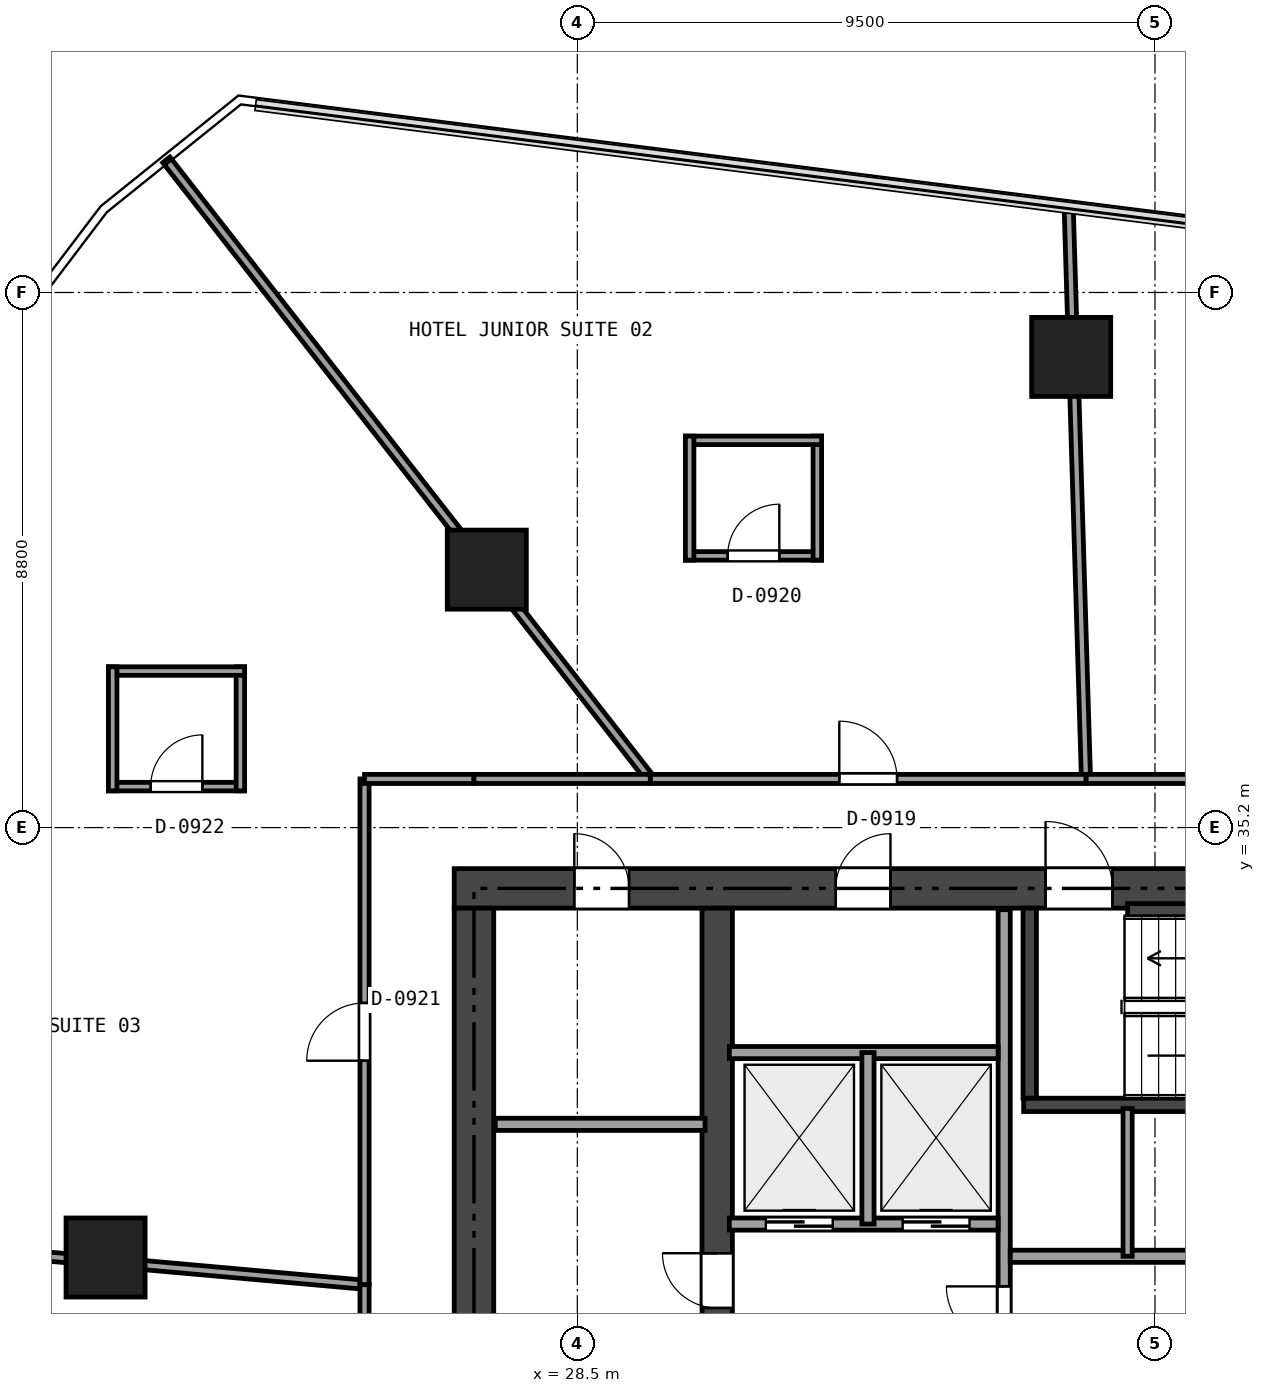
"""IFC4 building model, lengths in metres.
Left out: names, types, materials, properties, quantities, classifications, styles, units other than length and angle.
Written with IfcOpenShell. Run it as: python <this file> out.ifc"""

import sys

from ifc_helpers import new_model, si_unit, direction, frame, frame_2d, origin, origin_2d, place, context, subcontext, project, spatial, rectangle, extrude, element, fill, save


model = new_model("IFC4")
c1 = context("Model", 3, precision=1e-05, world=origin(), true_north=direction((0.0, 1.0)))
c2 = subcontext(c1, "Body", "Model", "MODEL_VIEW")
j1 = project(units=[si_unit("LENGTHUNIT", "METRE"), si_unit("PLANEANGLEUNIT", "RADIAN")], contexts=[c1])
p1 = place(None, origin())
s1 = spatial("IfcSite", under=j1, at=p1, CompositionType="ELEMENT")
p2 = place(p1, origin())
s2 = spatial("IfcBuilding", under=s1, at=p2, CompositionType="ELEMENT")
p3 = place(p2, frame((0.0, 0.0, 40.8)))
s3 = spatial("IfcBuildingStorey", under=s2, at=p3, CompositionType="ELEMENT", Elevation=40.8)
p4 = place(p3, frame((26.475, 34.2, 0.0), z_axis=(0.0, 0.0, 1.0), x_axis=(1.0, 0.0, 0.0)))
e1 = element("IfcWall", 1, at=p4, inside=s3, PredefinedType="SHEAR", context=c2, shape_type="SweptSolid", body=[
    extrude(rectangle(XDim=21.45, YDim=0.65, at=frame_2d((10.725, 0.0))), origin(), (0.0, 0.0, 1.0), 3.17),
])
p5 = place(p4, frame((9.725, 0.0, 0.0)))
e2 = element("IfcOpeningElement", 2, at=p5, cuts=e1, PredefinedType="OPENING", context=c2, shape_type="SweptSolid", body=[
    extrude(rectangle(XDim=1.1, YDim=2.15, at=frame_2d((0.55, 1.075))), frame((0.0, 0.335, 0.0), z_axis=(0.0, -1.0, 0.0), x_axis=(1.0, 0.0, 0.0)), (0.0, 0.0, 1.0), 0.67),
])
p6 = place(p4, frame((1.975, 0.0, 0.0)))
e3 = element("IfcOpeningElement", 3, at=p6, cuts=e1, PredefinedType="OPENING", context=c2, shape_type="SweptSolid", body=[
    extrude(rectangle(XDim=0.9, YDim=2.1, at=frame_2d((0.45, 1.05))), frame((0.0, 0.335, 0.0), z_axis=(0.0, -1.0, 0.0), x_axis=(1.0, 0.0, 0.0)), (0.0, 0.0, 1.0), 0.67),
])
p7 = place(p4, frame((6.275, 0.0, 0.0)))
e4 = element("IfcOpeningElement", 4, at=p7, cuts=e1, PredefinedType="OPENING", context=c2, shape_type="SweptSolid", body=[
    extrude(rectangle(XDim=0.9, YDim=2.1, at=frame_2d((0.45, 1.05))), frame((0.0, 0.335, 0.0), z_axis=(0.0, -1.0, 0.0), x_axis=(1.0, 0.0, 0.0)), (0.0, 0.0, 1.0), 0.67),
])
p8 = place(p3, frame((26.8, 18.925, 0.0), z_axis=(0.0, 0.0, 1.0), x_axis=(0.0, 1.0, 0.0)))
e5 = element("IfcWall", 5, at=p8, inside=s3, PredefinedType="SHEAR", context=c2, shape_type="SweptSolid", body=[
    extrude(rectangle(XDim=14.95, YDim=0.65, at=frame_2d((7.475, 0.0))), origin(), (0.0, 0.0, 1.0), 3.17),
])
p9 = place(p3, frame((30.8, 18.925, 0.0), z_axis=(0.0, 0.0, 1.0), x_axis=(0.0, 1.0, 0.0)))
e6 = element("IfcWall", 6, at=p9, inside=s3, PredefinedType="SHEAR", context=c2, shape_type="SweptSolid", body=[
    extrude(rectangle(XDim=14.95, YDim=0.5, at=frame_2d((7.475, 0.0))), origin(), (0.0, 0.0, 1.0), 3.17),
])
p10 = place(p9, frame((6.575, 0.0, 0.0)))
e7 = element("IfcOpeningElement", 7, at=p10, cuts=e6, PredefinedType="OPENING", context=c2, shape_type="SweptSolid", body=[
    extrude(rectangle(XDim=1.1, YDim=2.15, at=frame_2d((0.55, 1.075))), frame((0.0, 0.26, 0.0), z_axis=(0.0, -1.0, 0.0), x_axis=(1.0, 0.0, 0.0)), (0.0, 0.0, 1.0), 0.52),
])
p11 = place(p9, frame((8.375, 0.0, 0.0)))
e8 = element("IfcOpeningElement", 8, at=p11, cuts=e6, PredefinedType="OPENING", context=c2, shape_type="SweptSolid", body=[
    extrude(rectangle(XDim=0.9, YDim=2.1, at=frame_2d((0.45, 1.05))), frame((0.0, 0.26, 0.0), z_axis=(0.0, -1.0, 0.0), x_axis=(1.0, 0.0, 0.0)), (0.0, 0.0, 1.0), 0.52),
])
p12 = place(p3, frame((35.84, 30.64, 0.0), z_axis=(0.0, 0.0, 1.0), x_axis=(1.0, 0.0, 0.0)))
e9 = element("IfcWall", 9, at=p12, inside=s3, PredefinedType="SHEAR", context=c2, shape_type="SweptSolid", body=[
    extrude(rectangle(XDim=7.61, YDim=0.22, at=frame_2d((3.805, 0.0))), origin(), (0.0, 0.0, 1.0), 3.17),
])
p13 = place(p3, frame((35.94, 30.75, 0.0), z_axis=(0.0, 0.0, 1.0), x_axis=(0.0, 1.0, 0.0)))
e10 = element("IfcWall", 10, at=p13, inside=s3, PredefinedType="SHEAR", context=c2, shape_type="SweptSolid", body=[
    extrude(rectangle(XDim=3.125, YDim=0.22, at=frame_2d((1.562, 0.0))), origin(), (0.0, 0.0, 1.0), 3.17),
])
p14 = place(p3, frame((37.55, 33.84, 0.0), z_axis=(0.0, 0.0, 1.0), x_axis=(1.0, 0.0, 0.0)))
e11 = element("IfcWall", 11, at=p14, inside=s3, PredefinedType="SHEAR", context=c2, shape_type="SweptSolid", body=[
    extrude(rectangle(XDim=5.9, YDim=0.22, at=frame_2d((2.95, 0.0))), origin(), (0.0, 0.0, 1.0), 3.17),
])
for number, where, z_axis, x_axis in (
    (12, (36.622, 42.94, 0.0), (0.0, 0.0, 1.0), (1.0, 0.0, 0.0)),
    (13, (27.011, 39.442, 0.0), (0.0, 0.0, 1.0), (1.0, 0.0, 0.0)),
    (14, (20.741, 28.13, 0.0), (0.0, 0.0, 1.0), (1.0, 0.0, 0.0)),
):
    element("IfcColumn", number, at=place(p3, frame(where, z_axis=z_axis, x_axis=x_axis)), inside=s3, PredefinedType="COLUMN", context=c2, shape_type="SweptSolid", body=[
        extrude(rectangle(XDim=1.3, YDim=1.3, at=origin_2d()), origin(), (0.0, 0.0, 1.0), 3.17),
    ])
p15 = place(p3, frame((27.15, 30.32, 0.0), z_axis=(0.0, 0.0, 1.0), x_axis=(1.0, 0.0, 0.0)))
e15 = element("IfcWall", 15, at=p15, inside=s3, PredefinedType="SOLIDWALL", context=c2, shape_type="SweptSolid", body=[
    extrude(rectangle(XDim=3.45, YDim=0.2, at=frame_2d((1.725, 0.0))), origin(), (0.0, 0.0, 1.0), 3.17),
])
p16 = place(p3, frame((35.52, 18.95, 0.0), z_axis=(0.0, 0.0, 1.0), x_axis=(0.0, 1.0, 0.0)))
e16 = element("IfcWall", 16, at=p16, inside=s3, PredefinedType="SOLIDWALL", context=c2, shape_type="SweptSolid", body=[
    extrude(rectangle(XDim=14.9, YDim=0.2, at=frame_2d((7.45, 0.0))), origin(), (0.0, 0.0, 1.0), 2.691),
])
p17 = place(p16, frame((7.755, 0.0, 0.0)))
e17 = element("IfcOpeningElement", 17, at=p17, cuts=e16, PredefinedType="OPENING", context=c2, shape_type="SweptSolid", body=[
    extrude(rectangle(XDim=0.95, YDim=2.15, at=frame_2d((0.475, 1.075))), frame((0.0, 0.11, 0.0), z_axis=(0.0, -1.0, 0.0), x_axis=(1.0, 0.0, 0.0)), (0.0, 0.0, 1.0), 0.22),
])
p18 = place(p16, frame((0.6, 0.0, 0.0)))
e18 = element("IfcOpeningElement", 18, at=p18, cuts=e16, PredefinedType="OPENING", context=c2, shape_type="SweptSolid", body=[
    extrude(rectangle(XDim=0.9, YDim=2.1, at=frame_2d((0.45, 1.05))), frame((0.0, 0.11, 0.0), z_axis=(0.0, -1.0, 0.0), x_axis=(1.0, 0.0, 0.0)), (0.0, 0.0, 1.0), 0.22),
])
p19 = place(p3, frame((31.0, 28.68, 0.0), z_axis=(0.0, 0.0, 1.0), x_axis=(1.0, 0.0, 0.0)))
e19 = element("IfcWall", 19, at=p19, inside=s3, PredefinedType="SOLIDWALL", context=c2, shape_type="SweptSolid", body=[
    extrude(rectangle(XDim=4.42, YDim=0.2, at=frame_2d((2.21, 0.0))), origin(), (0.0, 0.0, 1.0), 3.17),
])
p20 = place(p19, frame((0.6, 0.0, 0.0)))
e20 = element("IfcOpeningElement", 20, at=p20, cuts=e19, PredefinedType="OPENING", context=c2, shape_type="SweptSolid", body=[
    extrude(rectangle(XDim=1.1, YDim=2.15, at=frame_2d((0.55, 1.075))), frame((0.0, 0.11, 0.0), z_axis=(0.0, -1.0, 0.0), x_axis=(1.0, 0.0, 0.0)), (0.0, 0.0, 1.0), 0.22),
])
p21 = place(p19, frame((2.85, 0.0, 0.0)))
e21 = element("IfcOpeningElement", 21, at=p21, cuts=e19, PredefinedType="OPENING", context=c2, shape_type="SweptSolid", body=[
    extrude(rectangle(XDim=1.1, YDim=2.15, at=frame_2d((0.55, 1.075))), frame((0.0, 0.11, 0.0), z_axis=(0.0, -1.0, 0.0), x_axis=(1.0, 0.0, 0.0)), (0.0, 0.0, 1.0), 0.22),
])
p22 = place(p3, frame((31.0, 31.5, 0.0), z_axis=(0.0, 0.0, 1.0), x_axis=(1.0, 0.0, 0.0)))
e22 = element("IfcWall", 22, at=p22, inside=s3, PredefinedType="SOLIDWALL", context=c2, shape_type="SweptSolid", body=[
    extrude(rectangle(XDim=4.42, YDim=0.2, at=frame_2d((2.21, 0.0))), origin(), (0.0, 0.0, 1.0), 3.17),
])
p23 = place(p3, frame((33.28, 28.68, 0.0), z_axis=(0.0, 0.0, 1.0), x_axis=(0.0, 1.0, 0.0)))
e23 = element("IfcWall", 23, at=p23, inside=s3, PredefinedType="SOLIDWALL", context=c2, shape_type="SweptSolid", body=[
    extrude(rectangle(XDim=2.82, YDim=0.2, at=frame_2d((1.41, 0.0))), origin(), (0.0, 0.0, 1.0), 3.17),
])
p24 = place(p3, frame((35.62, 28.15, 0.0), z_axis=(0.0, 0.0, 1.0), x_axis=(1.0, 0.0, 0.0)))
e24 = element("IfcWall", 24, at=p24, inside=s3, PredefinedType="SOLIDWALL", context=c2, shape_type="SweptSolid", body=[
    extrude(rectangle(XDim=7.88, YDim=0.2, at=frame_2d((3.94, 0.0))), origin(), (0.0, 0.0, 1.0), 3.17),
])
p25 = place(p3, frame((37.55, 28.15, 0.0), z_axis=(0.0, 0.0, 1.0), x_axis=(0.0, 1.0, 0.0)))
e25 = element("IfcWall", 25, at=p25, inside=s3, PredefinedType="PARTITIONING", context=c2, shape_type="SweptSolid", body=[
    extrude(rectangle(XDim=2.43, YDim=0.15, at=frame_2d((1.215, 0.0))), origin(), (0.0, 0.0, 1.0), 3.17),
])
p26 = place(p3, frame((30.277, 39.668, 0.0), z_axis=(0.0, 0.0, 1.0), x_axis=(1.0, 0.0, 0.0)))
e26 = element("IfcWall", 26, at=p26, inside=s3, PredefinedType="PARTITIONING", context=c2, shape_type="SweptSolid", body=[
    extrude(rectangle(XDim=2.24, YDim=0.14, at=frame_2d((1.12, 0.0))), origin(), (0.0, 0.0, 1.0), 3.17),
])
p27 = place(p26, frame((0.695, 0.0, 0.0)))
e27 = element("IfcOpeningElement", 27, at=p27, cuts=e26, PredefinedType="OPENING", context=c2, shape_type="SweptSolid", body=[
    extrude(rectangle(XDim=0.85, YDim=2.1, at=frame_2d((0.425, 1.05))), frame((0.0, 0.08, 0.0), z_axis=(0.0, -1.0, 0.0), x_axis=(1.0, 0.0, 0.0)), (0.0, 0.0, 1.0), 0.16),
])
p28 = place(p3, frame((32.447, 39.598, 0.0), z_axis=(0.0, 0.0, 1.0), x_axis=(0.0, 1.0, 0.0)))
e28 = element("IfcWall", 28, at=p28, inside=s3, PredefinedType="PARTITIONING", context=c2, shape_type="SweptSolid", body=[
    extrude(rectangle(XDim=2.04, YDim=0.14, at=frame_2d((1.02, 0.0))), origin(), (0.0, 0.0, 1.0), 2.355),
])
p29 = place(p3, frame((32.517, 41.568, 0.0), z_axis=(0.0, 0.0, 1.0), x_axis=(-1.0, 0.0, 0.0)))
e29 = element("IfcWall", 29, at=p29, inside=s3, PredefinedType="PARTITIONING", context=c2, shape_type="SweptSolid", body=[
    extrude(rectangle(XDim=2.24, YDim=0.14, at=frame_2d((1.12, 0.0))), origin(), (0.0, 0.0, 1.0), 2.355),
])
p30 = place(p3, frame((30.347, 41.638, 0.0), z_axis=(0.0, 0.0, 1.0), x_axis=(0.0, -1.0, 0.0)))
e30 = element("IfcWall", 30, at=p30, inside=s3, PredefinedType="PARTITIONING", context=c2, shape_type="SweptSolid", body=[
    extrude(rectangle(XDim=2.04, YDim=0.14, at=frame_2d((1.02, 0.0))), origin(), (0.0, 0.0, 1.0), 2.355),
])
p31 = place(p3, frame((20.788, 35.874, 0.0), z_axis=(0.0, 0.0, 1.0), x_axis=(1.0, 0.0, 0.0)))
e31 = element("IfcWall", 31, at=p31, inside=s3, PredefinedType="PARTITIONING", context=c2, shape_type="SweptSolid", body=[
    extrude(rectangle(XDim=2.24, YDim=0.14, at=frame_2d((1.12, 0.0))), origin(), (0.0, 0.0, 1.0), 3.17),
])
p32 = place(p31, frame((0.695, 0.0, 0.0)))
e32 = element("IfcOpeningElement", 32, at=p32, cuts=e31, PredefinedType="OPENING", context=c2, shape_type="SweptSolid", body=[
    extrude(rectangle(XDim=0.85, YDim=2.1, at=frame_2d((0.425, 1.05))), frame((0.0, 0.08, 0.0), z_axis=(0.0, -1.0, 0.0), x_axis=(1.0, 0.0, 0.0)), (0.0, 0.0, 1.0), 0.16),
])
p33 = place(p3, frame((22.958, 35.804, 0.0), z_axis=(0.0, 0.0, 1.0), x_axis=(0.0, 1.0, 0.0)))
e33 = element("IfcWall", 33, at=p33, inside=s3, PredefinedType="PARTITIONING", context=c2, shape_type="SweptSolid", body=[
    extrude(rectangle(XDim=2.04, YDim=0.14, at=frame_2d((1.02, 0.0))), origin(), (0.0, 0.0, 1.0), 3.17),
])
p34 = place(p3, frame((23.028, 37.774, 0.0), z_axis=(0.0, 0.0, 1.0), x_axis=(-1.0, 0.0, 0.0)))
e34 = element("IfcWall", 34, at=p34, inside=s3, PredefinedType="PARTITIONING", context=c2, shape_type="SweptSolid", body=[
    extrude(rectangle(XDim=2.24, YDim=0.14, at=frame_2d((1.12, 0.0))), origin(), (0.0, 0.0, 1.0), 3.17),
])
p35 = place(p3, frame((20.858, 37.844, 0.0), z_axis=(0.0, 0.0, 1.0), x_axis=(0.0, -1.0, 0.0)))
e35 = element("IfcWall", 35, at=p35, inside=s3, PredefinedType="PARTITIONING", context=c2, shape_type="SweptSolid", body=[
    extrude(rectangle(XDim=2.04, YDim=0.14, at=frame_2d((1.02, 0.0))), origin(), (0.0, 0.0, 1.0), 3.17),
])
p36 = place(p3, frame((36.58, 45.434, 0.0), z_axis=(0.0, 0.0, 1.0), x_axis=(0.03018653739, -0.999544282641, 0.0)))
e36 = element("IfcWall", 36, at=p36, inside=s3, PredefinedType="PARTITIONING", context=c2, shape_type="SweptSolid", body=[
    extrude(rectangle(XDim=9.438, YDim=0.15, at=frame_2d((4.719, 0.0))), origin(), (0.0, 0.0, 1.0), 2.395),
])
p37 = place(p3, frame((36.865, 36.0, 0.0), z_axis=(0.0, 0.0, 1.0), x_axis=(1.0, 0.0, 0.0)))
e37 = element("IfcWall", 37, at=p37, inside=s3, PredefinedType="PARTITIONING", context=c2, shape_type="SweptSolid", body=[
    extrude(rectangle(XDim=7.31, YDim=0.15, at=frame_2d((3.655, 0.0))), origin(), (0.0, 0.0, 1.0), 2.395),
])
p38 = place(p37, frame((3.18, 0.0, 0.0)))
e38 = element("IfcOpeningElement", 38, at=p38, cuts=e37, PredefinedType="OPENING", context=c2, shape_type="SweptSolid", body=[
    extrude(rectangle(XDim=0.95, YDim=2.15, at=frame_2d((0.475, 1.075))), frame((0.0, 0.085, 0.0), z_axis=(0.0, -1.0, 0.0), x_axis=(1.0, 0.0, 0.0)), (0.0, 0.0, 1.0), 0.17),
])
p39 = place(p3, frame((21.74, 46.182, 0.0), z_axis=(0.0, 0.0, 1.0), x_axis=(0.615901715435, -0.787822998474, 0.0)))
e39 = element("IfcWall", 39, at=p39, inside=s3, PredefinedType="PARTITIONING", context=c2, shape_type="SweptSolid", body=[
    extrude(rectangle(XDim=12.924, YDim=0.15, at=frame_2d((6.462, 0.0))), origin(), (0.0, 0.0, 1.0), 2.395),
])
p40 = place(p3, frame((29.7, 36.0, 0.0), z_axis=(0.0, 0.0, 1.0), x_axis=(1.0, 0.0, 0.0)))
e40 = element("IfcWall", 40, at=p40, inside=s3, PredefinedType="PARTITIONING", context=c2, shape_type="SweptSolid", body=[
    extrude(rectangle(XDim=7.165, YDim=0.15, at=frame_2d((3.583, 0.0))), origin(), (0.0, 0.0, 1.0), 2.395),
])
p41 = place(p40, frame((3.108, 0.0, 0.0)))
e41 = element("IfcOpeningElement", 41, at=p41, cuts=e40, PredefinedType="OPENING", context=c2, shape_type="SweptSolid", body=[
    extrude(rectangle(XDim=0.95, YDim=2.15, at=frame_2d((0.475, 1.075))), frame((0.0, 0.085, 0.0), z_axis=(0.0, -1.0, 0.0), x_axis=(1.0, 0.0, 0.0)), (0.0, 0.0, 1.0), 0.17),
])
p42 = place(p3, frame((16.612, 28.429, 0.0), z_axis=(0.0, 0.0, 1.0), x_axis=(0.99605717102, -0.088713652045, 0.0)))
e42 = element("IfcWall", 42, at=p42, inside=s3, PredefinedType="PARTITIONING", context=c2, shape_type="SweptSolid", body=[
    extrude(rectangle(XDim=8.421, YDim=0.15, at=frame_2d((4.21, 0.0))), origin(), (0.0, 0.0, 1.0), 2.395),
])
p43 = place(p3, frame((25.0, 27.682, 0.0), z_axis=(0.0, 0.0, 1.0), x_axis=(0.0, 1.0, 0.0)))
e43 = element("IfcWall", 43, at=p43, inside=s3, PredefinedType="PARTITIONING", context=c2, shape_type="SweptSolid", body=[
    extrude(rectangle(XDim=8.318, YDim=0.15, at=frame_2d((4.159, 0.0))), origin(), (0.0, 0.0, 1.0), 2.355),
])
p44 = place(p43, frame((3.684, 0.0, 0.0)))
e44 = element("IfcOpeningElement", 44, at=p44, cuts=e43, PredefinedType="OPENING", context=c2, shape_type="SweptSolid", body=[
    extrude(rectangle(XDim=0.95, YDim=2.15, at=frame_2d((0.475, 1.075))), frame((0.0, 0.085, 0.0), z_axis=(0.0, -1.0, 0.0), x_axis=(1.0, 0.0, 0.0)), (0.0, 0.0, 1.0), 0.17),
])
p45 = place(p3, frame((25.0, 36.0, 0.0), z_axis=(0.0, 0.0, 1.0), x_axis=(1.0, 0.0, 0.0)))
e45 = element("IfcWall", 45, at=p45, inside=s3, PredefinedType="PARTITIONING", context=c2, shape_type="SweptSolid", body=[
    extrude(rectangle(XDim=1.8, YDim=0.15, at=frame_2d((0.9, 0.0))), origin(), (0.0, 0.0, 1.0), 2.355),
])
p46 = place(p3, frame((26.8, 36.0, 0.0), z_axis=(0.0, 0.0, 1.0), x_axis=(1.0, 0.0, 0.0)))
e46 = element("IfcWall", 46, at=p46, inside=s3, PredefinedType="PARTITIONING", context=c2, shape_type="SweptSolid", body=[
    extrude(rectangle(XDim=2.9, YDim=0.15, at=frame_2d((1.45, 0.0))), origin(), (0.0, 0.0, 1.0), 2.395),
])
p47 = place(p3, frame((25.0, 18.6, 0.0), z_axis=(0.0, 0.0, 1.0), x_axis=(0.0, 1.0, 0.0)))
e47 = element("IfcWall", 47, at=p47, inside=s3, PredefinedType="PARTITIONING", context=c2, shape_type="SweptSolid", body=[
    extrude(rectangle(XDim=9.082, YDim=0.15, at=frame_2d((4.541, 0.0))), origin(), (0.0, 0.0, 1.0), 2.395),
])
p48 = place(p47, frame((4.066, 0.0, 0.0)))
e48 = element("IfcOpeningElement", 48, at=p48, cuts=e47, PredefinedType="OPENING", context=c2, shape_type="SweptSolid", body=[
    extrude(rectangle(XDim=0.95, YDim=2.15, at=frame_2d((0.475, 1.075))), frame((0.0, 0.085, 0.0), z_axis=(0.0, -1.0, 0.0), x_axis=(1.0, 0.0, 0.0)), (0.0, 0.0, 1.0), 0.17),
])
p49 = place(p5, origin())
e49 = element("IfcDoor", 49, at=p49, inside=s3, OperationType="SINGLE_SWING_LEFT", PredefinedType="DOOR", context=c2, shape_type="SweptSolid", body=[
    extrude(rectangle(XDim=1.1, YDim=2.15, at=frame_2d((0.55, 1.075))), frame((0.0, 0.025, 0.0), z_axis=(0.0, -1.0, 0.0), x_axis=(1.0, 0.0, 0.0)), (0.0, 0.0, 1.0), 0.05),
])
fill(e2, e49)
p50 = place(p17, origin())
e50 = element("IfcDoor", 50, at=p50, inside=s3, OperationType="SINGLE_SWING_RIGHT", PredefinedType="DOOR", context=c2, shape_type="SweptSolid", body=[
    extrude(rectangle(XDim=0.95, YDim=2.15, at=frame_2d((0.475, 1.075))), frame((0.0, 0.025, 0.0), z_axis=(0.0, -1.0, 0.0), x_axis=(1.0, 0.0, 0.0)), (0.0, 0.0, 1.0), 0.05),
])
fill(e17, e50)
p51 = place(p11, origin())
e51 = element("IfcDoor", 51, at=p51, inside=s3, OperationType="SINGLE_SWING_RIGHT", PredefinedType="DOOR", context=c2, shape_type="SweptSolid", body=[
    extrude(rectangle(XDim=0.9, YDim=2.1, at=frame_2d((0.45, 1.05))), frame((0.0, 0.025, 0.0), z_axis=(0.0, -1.0, 0.0), x_axis=(1.0, 0.0, 0.0)), (0.0, 0.0, 1.0), 0.05),
])
fill(e8, e51)
p52 = place(p6, origin())
e52 = element("IfcDoor", 52, at=p52, inside=s3, OperationType="SINGLE_SWING_LEFT", PredefinedType="DOOR", context=c2, shape_type="SweptSolid", body=[
    extrude(rectangle(XDim=0.9, YDim=2.1, at=frame_2d((0.45, 1.05))), frame((0.0, 0.025, 0.0), z_axis=(0.0, -1.0, 0.0), x_axis=(1.0, 0.0, 0.0)), (0.0, 0.0, 1.0), 0.05),
])
fill(e3, e52)
p53 = place(p7, origin())
e53 = element("IfcDoor", 53, at=p53, inside=s3, OperationType="SINGLE_SWING_RIGHT", PredefinedType="DOOR", context=c2, shape_type="SweptSolid", body=[
    extrude(rectangle(XDim=0.9, YDim=2.1, at=frame_2d((0.45, 1.05))), frame((0.0, 0.025, 0.0), z_axis=(0.0, -1.0, 0.0), x_axis=(1.0, 0.0, 0.0)), (0.0, 0.0, 1.0), 0.05),
])
fill(e4, e53)
p54 = place(p20, origin())
e54 = element("IfcDoor", 54, at=p54, inside=s3, OperationType="SLIDING_TO_LEFT", PredefinedType="DOOR", context=c2, shape_type="SweptSolid", body=[
    extrude(rectangle(XDim=1.1, YDim=2.15, at=frame_2d((0.55, 1.075))), frame((0.0, 0.025, 0.0), z_axis=(0.0, -1.0, 0.0), x_axis=(1.0, 0.0, 0.0)), (0.0, 0.0, 1.0), 0.05),
])
fill(e20, e54)
p55 = place(p21, origin())
e55 = element("IfcDoor", 55, at=p55, inside=s3, OperationType="SLIDING_TO_LEFT", PredefinedType="DOOR", context=c2, shape_type="SweptSolid", body=[
    extrude(rectangle(XDim=1.1, YDim=2.15, at=frame_2d((0.55, 1.075))), frame((0.0, 0.025, 0.0), z_axis=(0.0, -1.0, 0.0), x_axis=(1.0, 0.0, 0.0)), (0.0, 0.0, 1.0), 0.05),
])
fill(e21, e55)
p56 = place(p41, origin())
e56 = element("IfcDoor", 56, at=p56, inside=s3, OperationType="SINGLE_SWING_LEFT", PredefinedType="DOOR", context=c2, shape_type="SweptSolid", body=[
    extrude(rectangle(XDim=0.95, YDim=2.15, at=frame_2d((0.475, 1.075))), frame((0.0, 0.025, 0.0), z_axis=(0.0, -1.0, 0.0), x_axis=(1.0, 0.0, 0.0)), (0.0, 0.0, 1.0), 0.05),
])
fill(e41, e56)
p57 = place(p27, origin())
e57 = element("IfcDoor", 57, at=p57, inside=s3, OperationType="SINGLE_SWING_RIGHT", PredefinedType="DOOR", context=c2, shape_type="SweptSolid", body=[
    extrude(rectangle(XDim=0.85, YDim=2.1, at=frame_2d((0.425, 1.05))), frame((0.0, 0.025, 0.0), z_axis=(0.0, -1.0, 0.0), x_axis=(1.0, 0.0, 0.0)), (0.0, 0.0, 1.0), 0.05),
])
fill(e27, e57)
p58 = place(p44, origin())
e58 = element("IfcDoor", 58, at=p58, inside=s3, OperationType="SINGLE_SWING_LEFT", PredefinedType="DOOR", context=c2, shape_type="SweptSolid", body=[
    extrude(rectangle(XDim=0.95, YDim=2.15, at=frame_2d((0.475, 1.075))), frame((0.0, 0.025, 0.0), z_axis=(0.0, -1.0, 0.0), x_axis=(1.0, 0.0, 0.0)), (0.0, 0.0, 1.0), 0.05),
])
fill(e44, e58)
p59 = place(p32, origin())
e59 = element("IfcDoor", 59, at=p59, inside=s3, OperationType="SINGLE_SWING_RIGHT", PredefinedType="DOOR", context=c2, shape_type="SweptSolid", body=[
    extrude(rectangle(XDim=0.85, YDim=2.1, at=frame_2d((0.425, 1.05))), frame((0.0, 0.025, 0.0), z_axis=(0.0, -1.0, 0.0), x_axis=(1.0, 0.0, 0.0)), (0.0, 0.0, 1.0), 0.05),
])
fill(e32, e59)
save(model, sys.argv[1])
